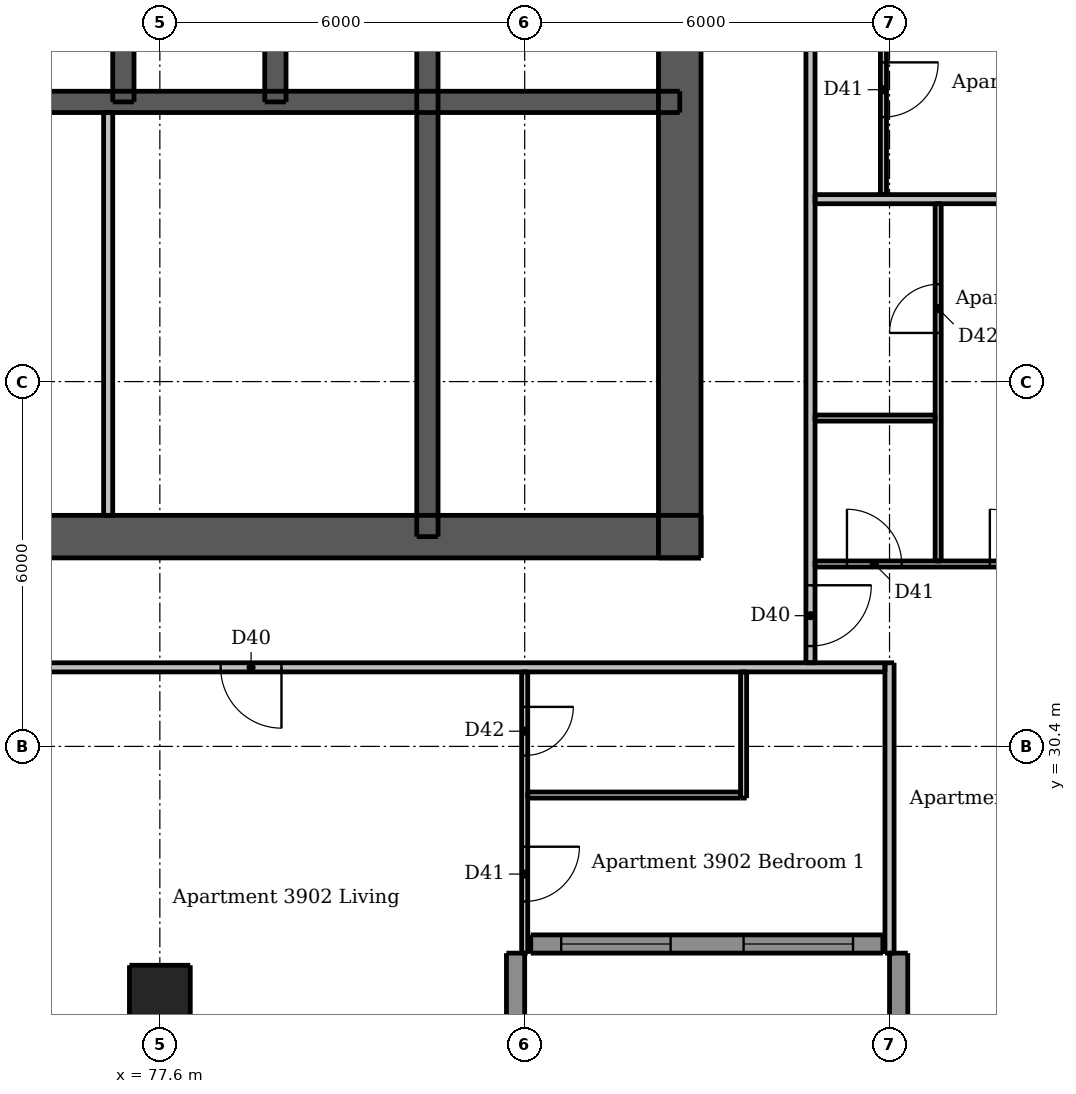
"""IFC4 building model, lengths in metres.
Left out: names, types, materials, properties, quantities, classifications, styles, units other than length and angle.
Written with IfcOpenShell. Run it as: python <this file> out.ifc"""

import sys

from ifc_helpers import new_model, si_unit, direction, frame, frame_2d, origin, origin_2d, place, context, subcontext, project, spatial, rectangle, extrude, element, fill, save


model = new_model("IFC4")
c1 = context("Model", 3, precision=1e-05, world=origin(), true_north=direction((0.0, 1.0)))
c2 = subcontext(c1, "Body", "Model", "MODEL_VIEW")
j1 = project(units=[si_unit("LENGTHUNIT", "METRE"), si_unit("PLANEANGLEUNIT", "RADIAN")], contexts=[c1])
p1 = place(None, origin())
s1 = spatial("IfcSite", under=j1, at=p1, CompositionType="ELEMENT")
p2 = place(p1, origin())
s2 = spatial("IfcBuilding", under=s1, at=p2, CompositionType="ELEMENT")
p3 = place(p2, frame((0.0, 0.0, 147.1)))
s3 = spatial("IfcBuildingStorey", under=s2, at=p3, CompositionType="ELEMENT", Elevation=147.1)
p4 = place(p3, frame((62.5, 33.85, 0.0), z_axis=(0.0, 0.0, 1.0), x_axis=(1.0, 0.0, 0.0)))
e1 = element("IfcWall", 1, at=p4, inside=s3, PredefinedType="SHEAR", context=c2, shape_type="SweptSolid", body=[
    extrude(rectangle(XDim=24.0, YDim=0.7, at=frame_2d((12.0, 0.0))), origin(), (0.0, 0.0, 1.0), 3.0),
])
p5 = place(p4, frame((1.962, 0.0, 0.0)))
e2 = element("IfcOpeningElement", 2, at=p5, cuts=e1, PredefinedType="OPENING", context=c2, shape_type="SweptSolid", body=[
    extrude(rectangle(XDim=1.1, YDim=2.1, at=frame_2d((0.55, 1.05))), frame((0.0, 0.36, 0.0), z_axis=(0.0, -1.0, 0.0), x_axis=(1.0, 0.0, 0.0)), (0.0, 0.0, 1.0), 0.72),
])
p6 = place(p4, frame((20.938, 0.0, 0.0)))
e3 = element("IfcOpeningElement", 3, at=p6, cuts=e1, PredefinedType="OPENING", context=c2, shape_type="SweptSolid", body=[
    extrude(rectangle(XDim=1.1, YDim=2.1, at=frame_2d((0.55, 1.05))), frame((0.0, 0.36, 0.0), z_axis=(0.0, -1.0, 0.0), x_axis=(1.0, 0.0, 0.0)), (0.0, 0.0, 1.0), 0.72),
])
p7 = place(p4, frame((8.0, 0.0, 0.0)))
e4 = element("IfcOpeningElement", 4, at=p7, cuts=e1, PredefinedType="OPENING", context=c2, shape_type="SweptSolid", body=[
    extrude(rectangle(XDim=1.1, YDim=2.1, at=frame_2d((0.55, 1.05))), frame((0.0, 0.36, 0.0), z_axis=(0.0, -1.0, 0.0), x_axis=(1.0, 0.0, 0.0)), (0.0, 0.0, 1.0), 0.72),
])
p8 = place(p4, frame((16.375, 0.0, 0.0)))
e5 = element("IfcOpeningElement", 5, at=p8, cuts=e1, PredefinedType="OPENING", context=c2, shape_type="SweptSolid", body=[
    extrude(rectangle(XDim=0.9, YDim=2.1, at=frame_2d((0.45, 1.05))), frame((0.0, 0.36, 0.0), z_axis=(0.0, -1.0, 0.0), x_axis=(1.0, 0.0, 0.0)), (0.0, 0.0, 1.0), 0.72),
])
p9 = place(p3, frame((86.15, 33.5, 0.0), z_axis=(0.0, 0.0, 1.0), x_axis=(0.0, 1.0, 0.0)))
e6 = element("IfcWall", 6, at=p9, inside=s3, PredefinedType="SHEAR", context=c2, shape_type="SweptSolid", body=[
    extrude(rectangle(XDim=24.0, YDim=0.7, at=frame_2d((12.0, 0.0))), origin(), (0.0, 0.0, 1.0), 3.0),
])
p10 = place(p9, frame((11.2, 0.0, 0.0)))
e7 = element("IfcOpeningElement", 7, at=p10, cuts=e6, PredefinedType="OPENING", context=c2, shape_type="SweptSolid", body=[
    extrude(rectangle(XDim=1.6, YDim=2.1, at=frame_2d((0.8, 1.05))), frame((0.0, 0.36, 0.0), z_axis=(0.0, -1.0, 0.0), x_axis=(1.0, 0.0, 0.0)), (0.0, 0.0, 1.0), 0.72),
])
p11 = place(p3, frame((62.85, 41.0, 0.0), z_axis=(0.0, 0.0, 1.0), x_axis=(1.0, 0.0, 0.0)))
e8 = element("IfcWall", 8, at=p11, inside=s3, PredefinedType="SHEAR", context=c2, shape_type="SweptSolid", body=[
    extrude(rectangle(XDim=23.3, YDim=0.35, at=frame_2d((11.65, 0.0))), origin(), (0.0, 0.0, 1.0), 3.0),
])
p12 = place(p3, frame((82.0, 33.85, 0.0), z_axis=(0.0, 0.0, 1.0), x_axis=(0.0, 1.0, 0.0)))
e9 = element("IfcWall", 9, at=p12, inside=s3, PredefinedType="SHEAR", context=c2, shape_type="SweptSolid", body=[
    extrude(rectangle(XDim=10.05, YDim=0.35, at=frame_2d((5.025, 0.0))), origin(), (0.0, 0.0, 1.0), 3.0),
])
for number, where, z_axis, x_axis in (
    (10, (77.0, 41.0, 0.0), (0.0, 0.0, 1.0), (0.0, 1.0, 0.0)),
    (11, (79.5, 41.0, 0.0), (0.0, 0.0, 1.0), (0.0, 1.0, 0.0)),
):
    element("IfcWall", number, at=place(p3, frame(where, z_axis=z_axis, x_axis=x_axis)), inside=s3, PredefinedType="SHEAR", context=c2, shape_type="SweptSolid", body=[
        extrude(rectangle(XDim=2.9, YDim=0.35, at=frame_2d((1.45, 0.0))), origin(), (0.0, 0.0, 1.0), 3.0),
    ])
p13 = place(p3, frame((77.6, 26.3, 0.0), z_axis=(0.0, 0.0, 1.0), x_axis=(1.0, 0.0, 0.0)))
e12 = element("IfcColumn", 12, at=p13, inside=s3, PredefinedType="COLUMN", context=c2, shape_type="SweptSolid", body=[
    extrude(rectangle(XDim=1.0, YDim=1.0, at=origin_2d()), origin(), (0.0, 0.0, 1.0), 3.0),
])
for number, where, z_axis, x_axis in (
    (13, (83.45, 25.3, 0.0), (0.0, 0.0, 1.0), (0.0, 1.0, 0.0)),
    (14, (89.75, 27.0, 0.0), (0.0, 0.0, 1.0), (0.0, -1.0, 0.0)),
):
    element("IfcWall", number, at=place(p3, frame(where, z_axis=z_axis, x_axis=x_axis)), inside=s3, PredefinedType="SOLIDWALL", context=c2, shape_type="SweptSolid", body=[
        extrude(rectangle(XDim=1.7, YDim=0.3, at=frame_2d((0.85, 0.0))), origin(), (0.0, 0.0, 1.0), 3.0),
    ])
p14 = place(p3, frame((83.7, 27.15, 0.0), z_axis=(0.0, 0.0, 1.0), x_axis=(1.0, 0.0, 0.0)))
e15 = element("IfcWall", 15, at=p14, inside=s3, PredefinedType="SOLIDWALL", context=c2, shape_type="SweptSolid", body=[
    extrude(rectangle(XDim=5.79, YDim=0.3, at=frame_2d((2.895, 0.0))), origin(), (0.0, 0.0, 1.0), 3.0),
])
p15 = place(p14, frame((0.5, 0.0, 0.15)))
e16 = element("IfcOpeningElement", 16, at=p15, cuts=e15, PredefinedType="OPENING", context=c2, shape_type="SweptSolid", body=[
    extrude(rectangle(XDim=1.8, YDim=2.1, at=frame_2d((0.9, 1.05))), frame((0.0, 0.16, 0.0), z_axis=(0.0, -1.0, 0.0), x_axis=(1.0, 0.0, 0.0)), (0.0, 0.0, 1.0), 0.32),
])
p16 = place(p14, frame((3.5, 0.0, 0.15)))
e17 = element("IfcOpeningElement", 17, at=p16, cuts=e15, PredefinedType="OPENING", context=c2, shape_type="SweptSolid", body=[
    extrude(rectangle(XDim=1.8, YDim=2.1, at=frame_2d((0.9, 1.05))), frame((0.0, 0.16, 0.0), z_axis=(0.0, -1.0, 0.0), x_axis=(1.0, 0.0, 0.0)), (0.0, 0.0, 1.0), 0.32),
])
p17 = place(p3, frame((76.75, 34.2, 0.0), z_axis=(0.0, 0.0, 1.0), x_axis=(0.0, 1.0, 0.0)))
e18 = element("IfcWall", 18, at=p17, inside=s3, PredefinedType="PLUMBINGWALL", context=c2, shape_type="SweptSolid", body=[
    extrude(rectangle(XDim=6.625, YDim=0.15, at=frame_2d((3.312, 0.0))), origin(), (0.0, 0.0, 1.0), 3.0),
])
p18 = place(p3, frame((83.6, 31.625, 0.0), z_axis=(0.0, 0.0, 1.0), x_axis=(0.0, -1.0, 0.0)))
e19 = element("IfcWall", 19, at=p18, inside=s3, PredefinedType="PARTITIONING", context=c2, shape_type="SweptSolid", body=[
    extrude(rectangle(XDim=4.625, YDim=0.1, at=frame_2d((2.312, 0.0))), origin(), (0.0, 0.0, 1.0), 2.54),
])
p19 = place(p18, frame((2.875, 0.0, 0.0)))
e20 = element("IfcOpeningElement", 20, at=p19, cuts=e19, PredefinedType="OPENING", context=c2, shape_type="SweptSolid", body=[
    extrude(rectangle(XDim=0.9, YDim=2.1, at=frame_2d((0.45, 1.05))), frame((0.0, 0.06, 0.0), z_axis=(0.0, -1.0, 0.0), x_axis=(1.0, 0.0, 0.0)), (0.0, 0.0, 1.0), 0.12),
])
p20 = place(p18, frame((0.575, 0.0, 0.0)))
e21 = element("IfcOpeningElement", 21, at=p20, cuts=e19, PredefinedType="OPENING", context=c2, shape_type="SweptSolid", body=[
    extrude(rectangle(XDim=0.8, YDim=2.1, at=frame_2d((0.4, 1.05))), frame((0.0, 0.06, 0.0), z_axis=(0.0, -1.0, 0.0), x_axis=(1.0, 0.0, 0.0)), (0.0, 0.0, 1.0), 0.12),
])
p21 = place(p3, frame((87.2, 29.55, 0.0), z_axis=(0.0, 0.0, 1.0), x_axis=(0.0, 1.0, 0.0)))
e22 = element("IfcWall", 22, at=p21, inside=s3, PredefinedType="PARTITIONING", context=c2, shape_type="SweptSolid", body=[
    extrude(rectangle(XDim=2.075, YDim=0.1, at=frame_2d((1.038, 0.0))), origin(), (0.0, 0.0, 1.0), 3.0),
])
p22 = place(p3, frame((89.5, 54.325, 0.0), z_axis=(0.0, 0.0, 1.0), x_axis=(0.0, -1.0, 0.0)))
e23 = element("IfcWall", 23, at=p22, inside=s3, PredefinedType="PARTITIONING", context=c2, shape_type="SweptSolid", body=[
    extrude(rectangle(XDim=14.85, YDim=0.1, at=frame_2d((7.425, 0.0))), origin(), (0.0, 0.0, 1.0), 3.0),
])
p23 = place(p22, frame((5.475, 0.0, 0.0)))
e24 = element("IfcOpeningElement", 24, at=p23, cuts=e23, PredefinedType="OPENING", context=c2, shape_type="SweptSolid", body=[
    extrude(rectangle(XDim=0.9, YDim=2.1, at=frame_2d((0.45, 1.05))), frame((0.0, 0.06, 0.0), z_axis=(0.0, -1.0, 0.0), x_axis=(1.0, 0.0, 0.0)), (0.0, 0.0, 1.0), 0.12),
])
p24 = place(p22, frame((0.975, 0.0, 0.0)))
e25 = element("IfcOpeningElement", 25, at=p24, cuts=e23, PredefinedType="OPENING", context=c2, shape_type="SweptSolid", body=[
    extrude(rectangle(XDim=0.9, YDim=2.1, at=frame_2d((0.45, 1.05))), frame((0.0, 0.06, 0.0), z_axis=(0.0, -1.0, 0.0), x_axis=(1.0, 0.0, 0.0)), (0.0, 0.0, 1.0), 0.12),
])
p25 = place(p22, frame((12.675, 0.0, 0.0)))
e26 = element("IfcOpeningElement", 26, at=p25, cuts=e23, PredefinedType="OPENING", context=c2, shape_type="SweptSolid", body=[
    extrude(rectangle(XDim=0.9, YDim=2.1, at=frame_2d((0.45, 1.05))), frame((0.0, 0.06, 0.0), z_axis=(0.0, -1.0, 0.0), x_axis=(1.0, 0.0, 0.0)), (0.0, 0.0, 1.0), 0.12),
])
p26 = place(p22, frame((9.725, 0.0, 0.0)))
e27 = element("IfcOpeningElement", 27, at=p26, cuts=e23, PredefinedType="OPENING", context=c2, shape_type="SweptSolid", body=[
    extrude(rectangle(XDim=0.8, YDim=2.1, at=frame_2d((0.4, 1.05))), frame((0.0, 0.06, 0.0), z_axis=(0.0, -1.0, 0.0), x_axis=(1.0, 0.0, 0.0)), (0.0, 0.0, 1.0), 0.12),
])
p27 = place(p3, frame((90.4, 33.45, 0.0), z_axis=(0.0, 0.0, 1.0), x_axis=(0.0, 1.0, 0.0)))
e28 = element("IfcWall", 28, at=p27, inside=s3, PredefinedType="PARTITIONING", context=c2, shape_type="SweptSolid", body=[
    extrude(rectangle(XDim=5.875, YDim=0.1, at=frame_2d((2.938, 0.0))), origin(), (0.0, 0.0, 1.0), 3.0),
])
p28 = place(p27, frame((3.75, 0.0, 0.0)))
e29 = element("IfcOpeningElement", 29, at=p28, cuts=e28, PredefinedType="OPENING", context=c2, shape_type="SweptSolid", body=[
    extrude(rectangle(XDim=0.8, YDim=2.1, at=frame_2d((0.4, 1.05))), frame((0.0, 0.06, 0.0), z_axis=(0.0, -1.0, 0.0), x_axis=(1.0, 0.0, 0.0)), (0.0, 0.0, 1.0), 0.12),
])
p29 = place(p3, frame((88.375, 35.8, 0.0), z_axis=(0.0, 0.0, 1.0), x_axis=(1.0, 0.0, 0.0)))
e30 = element("IfcWall", 30, at=p29, inside=s3, PredefinedType="PARTITIONING", context=c2, shape_type="SweptSolid", body=[
    extrude(rectangle(XDim=1.975, YDim=0.1, at=frame_2d((0.988, 0.0))), origin(), (0.0, 0.0, 1.0), 3.0),
])
p30 = place(p3, frame((88.375, 33.4, 0.0), z_axis=(0.0, 0.0, 1.0), x_axis=(1.0, 0.0, 0.0)))
e31 = element("IfcWall", 31, at=p30, inside=s3, PredefinedType="PARTITIONING", context=c2, shape_type="SweptSolid", body=[
    extrude(rectangle(XDim=4.625, YDim=0.1, at=frame_2d((2.312, 0.0))), origin(), (0.0, 0.0, 1.0), 3.0),
])
p31 = place(p30, frame((0.525, 0.0, 0.0)))
e32 = element("IfcOpeningElement", 32, at=p31, cuts=e31, PredefinedType="OPENING", context=c2, shape_type="SweptSolid", body=[
    extrude(rectangle(XDim=0.9, YDim=2.1, at=frame_2d((0.45, 1.05))), frame((0.0, 0.06, 0.0), z_axis=(0.0, -1.0, 0.0), x_axis=(1.0, 0.0, 0.0)), (0.0, 0.0, 1.0), 0.12),
])
p32 = place(p30, frame((2.875, 0.0, 0.0)))
e33 = element("IfcOpeningElement", 33, at=p32, cuts=e31, PredefinedType="OPENING", context=c2, shape_type="SweptSolid", body=[
    extrude(rectangle(XDim=0.9, YDim=2.1, at=frame_2d((0.45, 1.05))), frame((0.0, 0.06, 0.0), z_axis=(0.0, -1.0, 0.0), x_axis=(1.0, 0.0, 0.0)), (0.0, 0.0, 1.0), 0.12),
])
p33 = place(p3, frame((83.65, 29.6, 0.0), z_axis=(0.0, 0.0, 1.0), x_axis=(1.0, 0.0, 0.0)))
e34 = element("IfcWall", 34, at=p33, inside=s3, PredefinedType="PARTITIONING", context=c2, shape_type="SweptSolid", body=[
    extrude(rectangle(XDim=3.5, YDim=0.1, at=frame_2d((1.75, 0.0))), origin(), (0.0, 0.0, 1.0), 3.0),
])
p34 = place(p3, frame((88.3, 60.475, 0.0), z_axis=(0.0, 0.0, 1.0), x_axis=(0.0, -1.0, 0.0)))
e35 = element("IfcWall", 35, at=p34, inside=s3, PredefinedType="PARTITIONING", context=c2, shape_type="SweptSolid", body=[
    extrude(rectangle(XDim=28.7, YDim=0.15, at=frame_2d((14.35, 0.0))), origin(), (0.0, 0.0, 1.0), 3.0),
])
p35 = place(p34, frame((27.425, 0.0, 0.0)))
e36 = element("IfcOpeningElement", 36, at=p35, cuts=e35, PredefinedType="OPENING", context=c2, shape_type="SweptSolid", body=[
    extrude(rectangle(XDim=1.0, YDim=2.1, at=frame_2d((0.5, 1.05))), frame((0.0, 0.085, 0.0), z_axis=(0.0, -1.0, 0.0), x_axis=(1.0, 0.0, 0.0)), (0.0, 0.0, 1.0), 0.17),
])
p36 = place(p34, frame((13.075, 0.0, 0.0)))
e37 = element("IfcOpeningElement", 37, at=p36, cuts=e35, PredefinedType="OPENING", context=c2, shape_type="SweptSolid", body=[
    extrude(rectangle(XDim=1.0, YDim=2.1, at=frame_2d((0.5, 1.05))), frame((0.0, 0.085, 0.0), z_axis=(0.0, -1.0, 0.0), x_axis=(1.0, 0.0, 0.0)), (0.0, 0.0, 1.0), 0.17),
])
p37 = place(p34, frame((2.575, 0.0, 0.0)))
e38 = element("IfcOpeningElement", 38, at=p37, cuts=e35, PredefinedType="OPENING", context=c2, shape_type="SweptSolid", body=[
    extrude(rectangle(XDim=1.0, YDim=2.1, at=frame_2d((0.5, 1.05))), frame((0.0, 0.085, 0.0), z_axis=(0.0, -1.0, 0.0), x_axis=(1.0, 0.0, 0.0)), (0.0, 0.0, 1.0), 0.17),
])
p38 = place(p3, frame((89.6, 27.0, 0.0), z_axis=(0.0, 0.0, 1.0), x_axis=(0.0, 1.0, 0.0)))
e39 = element("IfcWall", 39, at=p38, inside=s3, PredefinedType="PARTITIONING", context=c2, shape_type="SweptSolid", body=[
    extrude(rectangle(XDim=4.775, YDim=0.15, at=frame_2d((2.387, 0.0))), origin(), (0.0, 0.0, 1.0), 2.46),
])
p39 = place(p3, frame((88.375, 39.4, 0.0), z_axis=(0.0, 0.0, 1.0), x_axis=(1.0, 0.0, 0.0)))
e40 = element("IfcWall", 40, at=p39, inside=s3, PredefinedType="PARTITIONING", context=c2, shape_type="SweptSolid", body=[
    extrude(rectangle(XDim=7.625, YDim=0.15, at=frame_2d((3.812, 0.0))), origin(), (0.0, 0.0, 1.0), 3.0),
])
p40 = place(p3, frame((89.525, 31.7, 0.0), z_axis=(0.0, 0.0, 1.0), x_axis=(-1.0, 0.0, 0.0)))
e41 = element("IfcWall", 41, at=p40, inside=s3, PredefinedType="PARTITIONING", context=c2, shape_type="SweptSolid", body=[
    extrude(rectangle(XDim=28.75, YDim=0.15, at=frame_2d((14.375, 0.0))), origin(), (0.0, 0.0, 1.0), 3.0),
])
p41 = place(p40, frame((25.875, 0.0, 0.0)))
e42 = element("IfcOpeningElement", 42, at=p41, cuts=e41, PredefinedType="OPENING", context=c2, shape_type="SweptSolid", body=[
    extrude(rectangle(XDim=1.0, YDim=2.1, at=frame_2d((0.5, 1.05))), frame((0.0, 0.085, 0.0), z_axis=(0.0, -1.0, 0.0), x_axis=(1.0, 0.0, 0.0)), (0.0, 0.0, 1.0), 0.17),
])
p42 = place(p40, frame((9.925, 0.0, 0.0)))
e43 = element("IfcOpeningElement", 43, at=p42, cuts=e41, PredefinedType="OPENING", context=c2, shape_type="SweptSolid", body=[
    extrude(rectangle(XDim=1.0, YDim=2.1, at=frame_2d((0.5, 1.05))), frame((0.0, 0.085, 0.0), z_axis=(0.0, -1.0, 0.0), x_axis=(1.0, 0.0, 0.0)), (0.0, 0.0, 1.0), 0.17),
])
p43 = place(p15, origin())
e44 = element("IfcWindow", 44, at=p43, inside=s3, PartitioningType="DOUBLE_PANEL_VERTICAL", PredefinedType="WINDOW", context=c2, shape_type="SweptSolid", body=[
    extrude(rectangle(XDim=1.8, YDim=2.1, at=frame_2d((0.9, 1.05))), frame((0.0, 0.03, 0.0), z_axis=(0.0, -1.0, 0.0), x_axis=(1.0, 0.0, 0.0)), (0.0, 0.0, 1.0), 0.06),
])
fill(e16, e44)
p44 = place(p16, origin())
e45 = element("IfcWindow", 45, at=p44, inside=s3, PartitioningType="DOUBLE_PANEL_VERTICAL", PredefinedType="WINDOW", context=c2, shape_type="SweptSolid", body=[
    extrude(rectangle(XDim=1.8, YDim=2.1, at=frame_2d((0.9, 1.05))), frame((0.0, 0.03, 0.0), z_axis=(0.0, -1.0, 0.0), x_axis=(1.0, 0.0, 0.0)), (0.0, 0.0, 1.0), 0.06),
])
fill(e17, e45)
p45 = place(p6, origin())
e46 = element("IfcDoor", 46, at=p45, inside=s3, OperationType="SINGLE_SWING_RIGHT", PredefinedType="DOOR", context=c2, shape_type="SweptSolid", body=[
    extrude(rectangle(XDim=1.1, YDim=2.1, at=frame_2d((0.55, 1.05))), frame((0.0, 0.337, 0.0), z_axis=(0.0, -1.0, 0.0), x_axis=(1.0, 0.0, 0.0)), (0.0, 0.0, 1.0), 0.05),
])
fill(e3, e46)
p46 = place(p8, origin())
e47 = element("IfcDoor", 47, at=p46, inside=s3, OperationType="SINGLE_SWING_LEFT", PredefinedType="DOOR", context=c2, shape_type="SweptSolid", body=[
    extrude(rectangle(XDim=0.9, YDim=2.1, at=frame_2d((0.45, 1.05))), frame((0.0, 0.337, 0.0), z_axis=(0.0, -1.0, 0.0), x_axis=(1.0, 0.0, 0.0)), (0.0, 0.0, 1.0), 0.05),
])
fill(e5, e47)
p47 = place(p42, origin())
e48 = element("IfcDoor", 48, at=p47, inside=s3, OperationType="SINGLE_SWING_LEFT", PredefinedType="DOOR", context=c2, shape_type="SweptSolid", body=[
    extrude(rectangle(XDim=1.0, YDim=2.1, at=frame_2d((0.5, 1.05))), frame((0.0, 0.025, 0.0), z_axis=(0.0, -1.0, 0.0), x_axis=(1.0, 0.0, 0.0)), (0.0, 0.0, 1.0), 0.05),
])
fill(e43, e48)
p48 = place(p19, origin())
e49 = element("IfcDoor", 49, at=p48, inside=s3, OperationType="SINGLE_SWING_LEFT", PredefinedType="DOOR", context=c2, shape_type="SweptSolid", body=[
    extrude(rectangle(XDim=0.9, YDim=2.1, at=frame_2d((0.45, 1.05))), frame((0.0, 0.025, 0.0), z_axis=(0.0, -1.0, 0.0), x_axis=(1.0, 0.0, 0.0)), (0.0, 0.0, 1.0), 0.05),
])
fill(e20, e49)
p49 = place(p20, origin())
e50 = element("IfcDoor", 50, at=p49, inside=s3, OperationType="SINGLE_SWING_LEFT", PredefinedType="DOOR", context=c2, shape_type="SweptSolid", body=[
    extrude(rectangle(XDim=0.8, YDim=2.1, at=frame_2d((0.4, 1.05))), frame((0.0, 0.025, 0.0), z_axis=(0.0, -1.0, 0.0), x_axis=(1.0, 0.0, 0.0)), (0.0, 0.0, 1.0), 0.05),
])
fill(e21, e50)
p50 = place(p35, origin())
e51 = element("IfcDoor", 51, at=p50, inside=s3, OperationType="SINGLE_SWING_LEFT", PredefinedType="DOOR", context=c2, shape_type="SweptSolid", body=[
    extrude(rectangle(XDim=1.0, YDim=2.1, at=frame_2d((0.5, 1.05))), frame((0.0, 0.025, 0.0), z_axis=(0.0, -1.0, 0.0), x_axis=(1.0, 0.0, 0.0)), (0.0, 0.0, 1.0), 0.05),
])
fill(e36, e51)
p51 = place(p31, origin())
e52 = element("IfcDoor", 52, at=p51, inside=s3, OperationType="SINGLE_SWING_LEFT", PredefinedType="DOOR", context=c2, shape_type="SweptSolid", body=[
    extrude(rectangle(XDim=0.9, YDim=2.1, at=frame_2d((0.45, 1.05))), frame((0.0, 0.025, 0.0), z_axis=(0.0, -1.0, 0.0), x_axis=(1.0, 0.0, 0.0)), (0.0, 0.0, 1.0), 0.05),
])
fill(e32, e52)
p52 = place(p32, origin())
e53 = element("IfcDoor", 53, at=p52, inside=s3, OperationType="SINGLE_SWING_LEFT", PredefinedType="DOOR", context=c2, shape_type="SweptSolid", body=[
    extrude(rectangle(XDim=0.9, YDim=2.1, at=frame_2d((0.45, 1.05))), frame((0.0, 0.025, 0.0), z_axis=(0.0, -1.0, 0.0), x_axis=(1.0, 0.0, 0.0)), (0.0, 0.0, 1.0), 0.05),
])
fill(e33, e53)
p53 = place(p28, origin())
e54 = element("IfcDoor", 54, at=p53, inside=s3, OperationType="SINGLE_SWING_LEFT", PredefinedType="DOOR", context=c2, shape_type="SweptSolid", body=[
    extrude(rectangle(XDim=0.8, YDim=2.1, at=frame_2d((0.4, 1.05))), frame((0.0, 0.025, 0.0), z_axis=(0.0, -1.0, 0.0), x_axis=(1.0, 0.0, 0.0)), (0.0, 0.0, 1.0), 0.05),
])
fill(e29, e54)
p54 = place(p25, origin())
e55 = element("IfcDoor", 55, at=p54, inside=s3, OperationType="SINGLE_SWING_LEFT", PredefinedType="DOOR", context=c2, shape_type="SweptSolid", body=[
    extrude(rectangle(XDim=0.9, YDim=2.1, at=frame_2d((0.45, 1.05))), frame((0.0, 0.025, 0.0), z_axis=(0.0, -1.0, 0.0), x_axis=(1.0, 0.0, 0.0)), (0.0, 0.0, 1.0), 0.05),
])
fill(e26, e55)
save(model, sys.argv[1])
